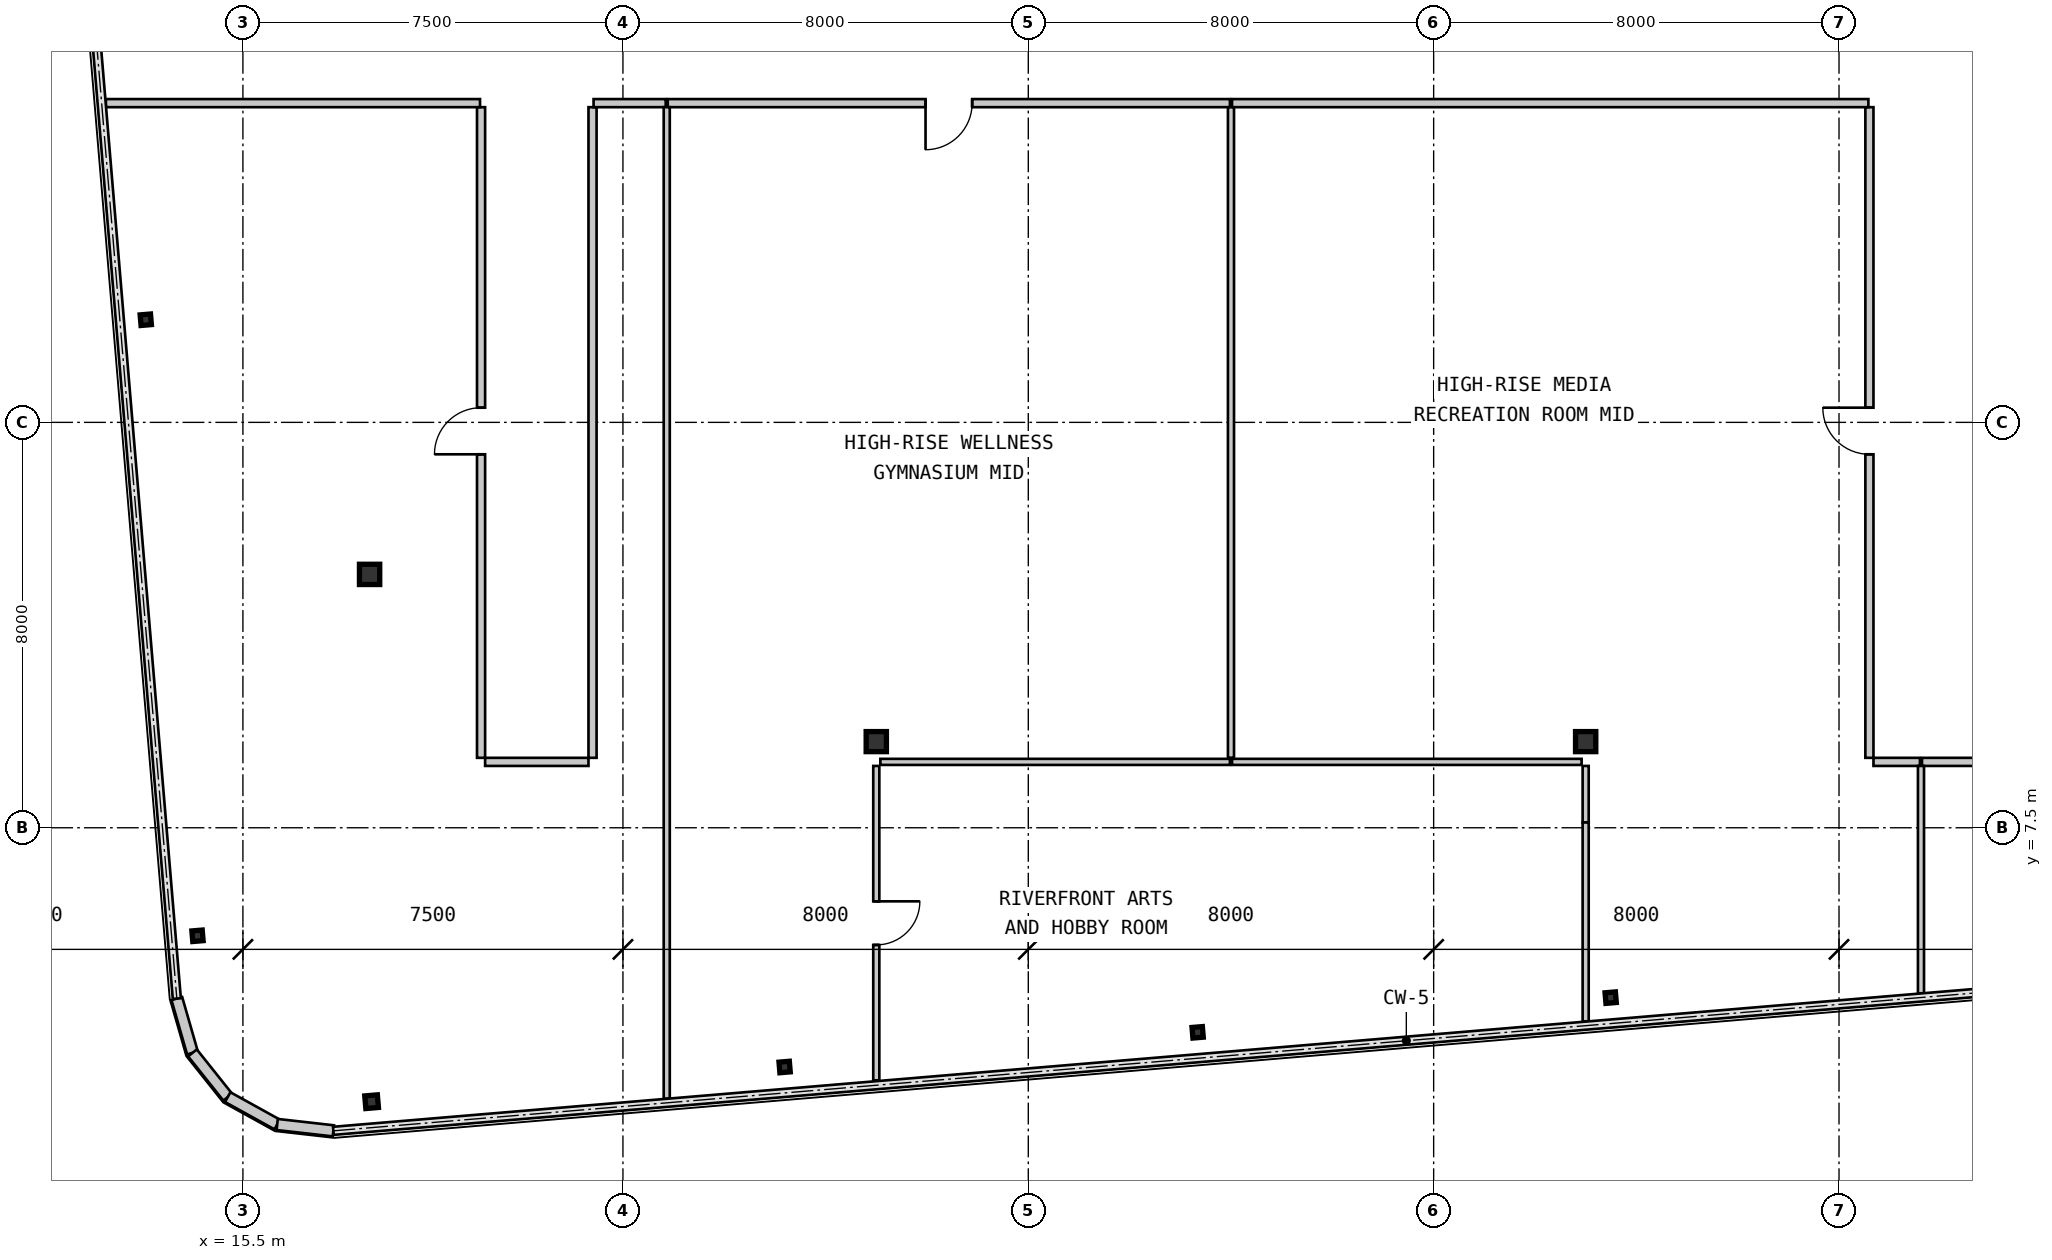
"""IFC4 building model, lengths in metres.
Left out: names, types, materials, properties, quantities, classifications, styles, units other than length and angle.
Written with IfcOpenShell. Run it as: python <this file> out.ifc"""

import sys

from ifc_helpers import new_model, si_unit, direction, frame, frame_2d, origin, origin_2d, place, context, subcontext, project, spatial, rectangle, hollow_rectangle, i_section, extrude, source, transform, mapped, element, fill, save


model = new_model("IFC4")
c1 = context("Model", 3, precision=1e-05, world=origin(), true_north=direction((0.0, 1.0)))
c2 = subcontext(c1, "Body", "Model", "MODEL_VIEW")
j1 = project(units=[si_unit("LENGTHUNIT", "METRE"), si_unit("PLANEANGLEUNIT", "RADIAN")], contexts=[c1])
p1 = place(None, origin())
s1 = spatial("IfcSite", under=j1, at=p1, CompositionType="ELEMENT")
p2 = place(p1, origin())
s2 = spatial("IfcBuilding", under=s1, at=p2, CompositionType="ELEMENT")
p3 = place(p2, frame((0.0, 0.0, 197.75)))
s3 = spatial("IfcBuildingStorey", under=s2, at=p3, CompositionType="ELEMENT", Elevation=197.75)
m1 = source(origin(), c2, "Body", "SweptSolid", [
    extrude(i_section(OverallWidth=0.4, OverallDepth=0.396, WebThickness=0.022, FlangeThickness=0.034, at=origin_2d()), origin(), (0.0, 0.0, 1.0), 3.15),
])
for number, where, z_axis, x_axis in (
    (1, (28.0, 9.2, 0.0), (0.0, 0.0, 1.0), (1.0, 0.0, 0.0)),
    (2, (42.0, 9.2, 0.0), (0.0, 0.0, 1.0), (1.0, 0.0, 0.0)),
):
    element("IfcColumn", number, at=place(p3, frame(where, z_axis=z_axis, x_axis=x_axis)), inside=s3, PredefinedType="COLUMN", context=c2, shape_type="MappedRepresentation", body=[
        mapped(m1, transform((0.0, 0.0, 0.0), scale=1.0)),
    ])
m2 = source(origin(), c2, "Body", "SweptSolid", [
    extrude(hollow_rectangle(XDim=0.4, YDim=0.4, WallThickness=0.016, at=origin_2d()), origin(), (0.0, 0.0, 1.0), 3.15),
])
p4 = place(p3, frame((18.0, 12.5, 0.0), z_axis=(0.0, 0.0, 1.0), x_axis=(1.0, 0.0, 0.0)))
e3 = element("IfcColumn", 3, at=p4, inside=s3, PredefinedType="COLUMN", context=c2, shape_type="MappedRepresentation", body=[
    mapped(m2, transform((0.0, 0.0, 0.0), scale=1.0)),
])
m3 = source(origin(), c2, "Body", "SweptSolid", [
    extrude(hollow_rectangle(XDim=0.25, YDim=0.25, WallThickness=0.01, at=origin_2d()), origin(), (0.0, 0.0, 1.0), 3.15),
])
p5 = place(p3, frame((18.04, 2.094, 0.0), z_axis=(0.0, 0.0, 1.0), x_axis=(0.99649285925, 0.083677843332, 0.0)))
e4 = element("IfcColumn", 4, at=p5, inside=s3, PredefinedType="COLUMN", context=c2, shape_type="MappedRepresentation", body=[
    mapped(m3, transform((0.0, 0.0, 0.0), scale=1.0)),
])
m4 = source(origin(), c2, "Body", "SweptSolid", [
    extrude(i_section(OverallWidth=0.205, OverallDepth=0.21, WebThickness=0.009, FlangeThickness=0.014, at=origin_2d()), origin(), (0.0, 0.0, 1.0), 3.15),
])
for number, where, z_axis, x_axis in (
    (5, (26.191, 2.779, 0.0), (0.0, 0.0, 1.0), (0.996, 0.084, 0.0)),
    (6, (34.342, 3.463, 0.0), (0.0, 0.0, 1.0), (0.996, 0.084, 0.0)),
    (7, (42.494, 4.147, 0.0), (0.0, 0.0, 1.0), (0.996, 0.084, 0.0)),
    (8, (14.604, 5.368, 0.0), (0.0, 0.0, 1.0), (0.996, 0.084, 0.0)),
    (9, (13.583, 17.525, 0.0), (0.0, 0.0, 1.0), (0.996, 0.084, 0.0)),
):
    element("IfcColumn", number, at=place(p3, frame(where, z_axis=z_axis, x_axis=x_axis)), inside=s3, PredefinedType="COLUMN", context=c2, shape_type="MappedRepresentation", body=[
        mapped(m4, transform((0.0, 0.0, 0.0), scale=1.0)),
    ])
m5 = source(origin(), c2, "Body", "SweptSolid", [
    extrude(rectangle(XDim=1.116, YDim=0.22, at=frame_2d((0.558, 0.0))), origin(), (0.0, 0.0, 1.0), 2.93),
])
for number, where, z_axis, x_axis in (
    (10, (14.196, 4.13, 0.0), (0.0, 0.0, 1.0), (0.277, -0.961, 0.0)),
    (11, (14.504, 3.057, 0.0), (0.0, 0.0, 1.0), (0.623, -0.782, 0.0)),
    (12, (15.2, 2.184, 0.0), (0.0, 0.0, 1.0), (0.875, -0.484, 0.0)),
    (13, (16.176, 1.644, 0.0), (0.0, 0.0, 1.0), (0.994, -0.112, 0.0)),
):
    element("IfcWall", number, at=place(p3, frame(where, z_axis=z_axis, x_axis=x_axis)), inside=s3, PredefinedType="SOLIDWALL", context=c2, shape_type="MappedRepresentation", body=[
        mapped(m5, transform((0.0, 0.0, 0.0), scale=1.0)),
    ])
m6 = source(origin(), c2, "Body", "SweptSolid", [
    extrude(rectangle(XDim=12.84, YDim=0.16, at=frame_2d((6.42, 0.0))), origin(), (0.0, 0.0, 1.0), 2.93),
])
p6 = place(p3, frame((20.2, 8.88, 0.0), z_axis=(0.0, 0.0, 1.0), x_axis=(0.0, 1.0, 0.0)))
e14 = element("IfcWall", 14, at=p6, inside=s3, PredefinedType="PARTITIONING", context=c2, shape_type="MappedRepresentation", body=[
    mapped(m6, transform((0.0, 0.0, 0.0), scale=1.0)),
])
m7 = source(origin(), c2, "Body", "SweptSolid", [
    extrude(rectangle(XDim=0.92, YDim=2.1, at=frame_2d((0.46, 1.05))), frame((0.0, 0.09, 0.0), z_axis=(0.0, -1.0, 0.0), x_axis=(1.0, 0.0, 0.0)), (0.0, 0.0, 1.0), 0.18),
])
p7 = place(p6, frame((5.99, 0.0, 0.0)))
e15 = element("IfcOpeningElement", 15, at=p7, cuts=e14, PredefinedType="OPENING", context=c2, shape_type="MappedRepresentation", body=[
    mapped(m7, transform((0.0, 0.0, 0.0), scale=1.0)),
])
p8 = place(p3, frame((22.4, 21.72, 0.0), z_axis=(0.0, 0.0, 1.0), x_axis=(0.0, -1.0, 0.0)))
e16 = element("IfcWall", 16, at=p8, inside=s3, PredefinedType="PARTITIONING", context=c2, shape_type="MappedRepresentation", body=[
    mapped(m6, transform((0.0, 0.0, 0.0), scale=1.0)),
])
m8 = source(origin(), c2, "Body", "SweptSolid", [
    extrude(rectangle(XDim=7.384, YDim=0.16, at=frame_2d((3.692, 0.0))), origin(), (0.0, 0.0, 1.0), 2.93),
])
p9 = place(p3, frame((20.18, 21.8, 0.0), z_axis=(0.0, 0.0, 1.0), x_axis=(-1.0, 0.0, 0.0)))
e17 = element("IfcWall", 17, at=p9, inside=s3, PredefinedType="PARTITIONING", context=c2, shape_type="MappedRepresentation", body=[
    mapped(m8, transform((0.0, 0.0, 0.0), scale=1.0)),
])
m9 = source(origin(), c2, "Body", "SweptSolid", [
    extrude(rectangle(XDim=2.04, YDim=0.16, at=frame_2d((1.02, 0.0))), origin(), (0.0, 0.0, 1.0), 2.93),
])
p10 = place(p3, frame((22.32, 8.8, 0.0), z_axis=(0.0, 0.0, 1.0), x_axis=(-1.0, 0.0, 0.0)))
e18 = element("IfcWall", 18, at=p10, inside=s3, PredefinedType="PARTITIONING", context=c2, shape_type="MappedRepresentation", body=[
    mapped(m9, transform((0.0, 0.0, 0.0), scale=1.0)),
])
m10 = source(origin(), c2, "Body", "SweptSolid", [
    extrude(rectangle(XDim=1.424, YDim=0.16, at=frame_2d((0.712, 0.0))), origin(), (0.0, 0.0, 1.0), 2.93),
])
p11 = place(p3, frame((23.844, 21.8, 0.0), z_axis=(0.0, 0.0, 1.0), x_axis=(-1.0, 0.0, 0.0)))
e19 = element("IfcWall", 19, at=p11, inside=s3, PredefinedType="PARTITIONING", context=c2, shape_type="MappedRepresentation", body=[
    mapped(m10, transform((0.0, 0.0, 0.0), scale=1.0)),
])
m11 = source(origin(), c2, "Body", "SweptSolid", [
    extrude(rectangle(XDim=11.095, YDim=0.16, at=frame_2d((5.547, 0.0))), origin(), (0.0, 0.0, 1.0), 2.93),
])
p12 = place(p3, frame((34.98, 21.8, 0.0), z_axis=(0.0, 0.0, 1.0), x_axis=(-1.0, 0.0, 0.0)))
e20 = element("IfcWall", 20, at=p12, inside=s3, PredefinedType="PARTITIONING", context=c2, shape_type="MappedRepresentation", body=[
    mapped(m11, transform((0.0, 0.0, 0.0), scale=1.0)),
])
p13 = place(p12, frame((5.087, 0.0, 0.0)))
e21 = element("IfcOpeningElement", 21, at=p13, cuts=e20, PredefinedType="OPENING", context=c2, shape_type="MappedRepresentation", body=[
    mapped(m7, transform((0.0, 0.0, 0.0), scale=1.0)),
])
p14 = place(p3, frame((47.6, 8.88, 0.0), z_axis=(0.0, 0.0, 1.0), x_axis=(0.0, 1.0, 0.0)))
e22 = element("IfcWall", 22, at=p14, inside=s3, PredefinedType="PARTITIONING", context=c2, shape_type="MappedRepresentation", body=[
    mapped(m6, transform((0.0, 0.0, 0.0), scale=1.0)),
])
p15 = place(p14, frame((5.99, 0.0, 0.0)))
e23 = element("IfcOpeningElement", 23, at=p15, cuts=e22, PredefinedType="OPENING", context=c2, shape_type="MappedRepresentation", body=[
    mapped(m7, transform((0.0, 0.0, 0.0), scale=1.0)),
])
m12 = source(origin(), c2, "Body", "SweptSolid", [
    extrude(rectangle(XDim=12.559, YDim=0.16, at=frame_2d((6.28, 0.0))), origin(), (0.0, 0.0, 1.0), 2.93),
])
p16 = place(p3, frame((47.58, 21.8, 0.0), z_axis=(0.0, 0.0, 1.0), x_axis=(-1.0, 0.0, 0.0)))
e24 = element("IfcWall", 24, at=p16, inside=s3, PredefinedType="PARTITIONING", context=c2, shape_type="MappedRepresentation", body=[
    mapped(m12, transform((0.0, 0.0, 0.0), scale=1.0)),
])
m13 = source(origin(), c2, "Body", "SweptSolid", [
    extrude(rectangle(XDim=0.917, YDim=0.16, at=frame_2d((0.459, 0.0))), origin(), (0.0, 0.0, 1.0), 2.93),
])
p17 = place(p3, frame((48.597, 8.8, 0.0), z_axis=(0.0, 0.0, 1.0), x_axis=(-1.0, 0.0, 0.0)))
e25 = element("IfcWall", 25, at=p17, inside=s3, PredefinedType="PARTITIONING", context=c2, shape_type="MappedRepresentation", body=[
    mapped(m13, transform((0.0, 0.0, 0.0), scale=1.0)),
])
m14 = source(origin(), c2, "Body", "SweptSolid", [
    extrude(rectangle(XDim=1.082, YDim=0.16, at=frame_2d((0.541, 0.0))), origin(), (0.0, 0.0, 1.0), 2.93),
])
p18 = place(p3, frame((49.72, 8.8, 0.0), z_axis=(0.0, 0.0, 1.0), x_axis=(-1.0, 0.0, 0.0)))
e26 = element("IfcWall", 26, at=p18, inside=s3, PredefinedType="PARTITIONING", context=c2, shape_type="MappedRepresentation", body=[
    mapped(m14, transform((0.0, 0.0, 0.0), scale=1.0)),
])
m15 = source(origin(), c2, "Body", "SweptSolid", [
    extrude(rectangle(XDim=6.9, YDim=0.12, at=frame_2d((3.45, 0.0))), origin(), (0.0, 0.0, 1.0), 2.93),
])
p19 = place(p3, frame((28.08, 8.8, 0.0), z_axis=(0.0, 0.0, 1.0), x_axis=(1.0, 0.0, 0.0)))
e27 = element("IfcWall", 27, at=p19, inside=s3, PredefinedType="PARTITIONING", context=c2, shape_type="MappedRepresentation", body=[
    mapped(m15, transform((0.0, 0.0, 0.0), scale=1.0)),
])
m16 = source(origin(), c2, "Body", "SweptSolid", [
    extrude(rectangle(XDim=6.204, YDim=0.12, at=frame_2d((3.102, 0.0))), origin(), (0.0, 0.0, 1.0), 2.93),
])
p20 = place(p3, frame((28.0, 2.516, 0.0), z_axis=(0.0, 0.0, 1.0), x_axis=(0.0, 1.0, 0.0)))
e28 = element("IfcWall", 28, at=p20, inside=s3, PredefinedType="PARTITIONING", context=c2, shape_type="MappedRepresentation", body=[
    mapped(m16, transform((0.0, 0.0, 0.0), scale=1.0)),
])
m17 = source(origin(), c2, "Body", "SweptSolid", [
    extrude(rectangle(XDim=0.86, YDim=2.1, at=frame_2d((0.43, 1.05))), frame((0.0, 0.07, 0.0), z_axis=(0.0, -1.0, 0.0), x_axis=(1.0, 0.0, 0.0)), (0.0, 0.0, 1.0), 0.14),
])
p21 = place(p20, frame((2.672, 0.0, 0.0)))
e29 = element("IfcOpeningElement", 29, at=p21, cuts=e28, PredefinedType="OPENING", context=c2, shape_type="MappedRepresentation", body=[
    mapped(m17, transform((0.0, 0.0, 0.0), scale=1.0)),
])
p22 = place(p3, frame((35.02, 8.8, 0.0), z_axis=(0.0, 0.0, 1.0), x_axis=(1.0, 0.0, 0.0)))
e30 = element("IfcWall", 30, at=p22, inside=s3, PredefinedType="PARTITIONING", context=c2, shape_type="MappedRepresentation", body=[
    mapped(m15, transform((0.0, 0.0, 0.0), scale=1.0)),
])
m18 = source(origin(), c2, "Body", "SweptSolid", [
    extrude(rectangle(XDim=1.116, YDim=0.12, at=frame_2d((0.558, 0.0))), origin(), (0.0, 0.0, 1.0), 2.47),
])
p23 = place(p3, frame((42.0, 8.72, 0.0), z_axis=(0.0, 0.0, 1.0), x_axis=(0.0, -1.0, 0.0)))
e31 = element("IfcWall", 31, at=p23, inside=s3, PredefinedType="PARTITIONING", context=c2, shape_type="MappedRepresentation", body=[
    mapped(m18, transform((0.0, 0.0, 0.0), scale=1.0)),
])
m19 = source(origin(), c2, "Body", "SweptSolid", [
    extrude(rectangle(XDim=3.926, YDim=0.12, at=frame_2d((1.963, 0.0))), origin(), (0.0, 0.0, 1.0), 2.93),
])
p24 = place(p3, frame((42.0, 7.604, 0.0), z_axis=(0.0, 0.0, 1.0), x_axis=(0.0, -1.0, 0.0)))
e32 = element("IfcWall", 32, at=p24, inside=s3, PredefinedType="PARTITIONING", context=c2, shape_type="MappedRepresentation", body=[
    mapped(m19, transform((0.0, 0.0, 0.0), scale=1.0)),
])
m20 = source(origin(), c2, "Body", "SweptSolid", [
    extrude(rectangle(XDim=19.565, YDim=0.12, at=frame_2d((9.782, 0.0))), origin(), (0.0, 0.0, 1.0), 2.93),
])
p25 = place(p3, frame((23.865, 21.72, 0.0), z_axis=(0.0, 0.0, 1.0), x_axis=(0.0, -1.0, 0.0)))
e33 = element("IfcWall", 33, at=p25, inside=s3, PredefinedType="PARTITIONING", context=c2, shape_type="MappedRepresentation", body=[
    mapped(m20, transform((0.0, 0.0, 0.0), scale=1.0)),
])
m21 = source(origin(), c2, "Body", "SweptSolid", [
    extrude(rectangle(XDim=12.836, YDim=0.12, at=frame_2d((6.418, 0.0))), origin(), (0.0, 0.0, 1.0), 2.93),
])
p26 = place(p3, frame((35.0, 21.718, 0.0), z_axis=(0.0, 0.0, 1.0), x_axis=(0.0, -1.0, 0.0)))
e34 = element("IfcWall", 34, at=p26, inside=s3, PredefinedType="PARTITIONING", context=c2, shape_type="MappedRepresentation", body=[
    mapped(m21, transform((0.0, 0.0, 0.0), scale=1.0)),
])
m22 = source(origin(), c2, "Body", "SweptSolid", [
    extrude(rectangle(XDim=4.487, YDim=0.12, at=frame_2d((2.243, 0.0))), origin(), (0.0, 0.0, 1.0), 2.93),
])
p27 = place(p3, frame((48.618, 8.72, 0.0), z_axis=(0.0, 0.0, 1.0), x_axis=(0.0, -1.0, 0.0)))
e35 = element("IfcWall", 35, at=p27, inside=s3, PredefinedType="PARTITIONING", context=c2, shape_type="MappedRepresentation", body=[
    mapped(m22, transform((0.0, 0.0, 0.0), scale=1.0)),
])
m23 = source(origin(), c2, "Body", "SweptSolid", [
    extrude(rectangle(XDim=0.92, YDim=2.1, at=frame_2d((0.46, 1.05))), frame((0.0, 0.025, 0.0), z_axis=(0.0, -1.0, 0.0), x_axis=(1.0, 0.0, 0.0)), (0.0, 0.0, 1.0), 0.05),
])
p28 = place(p7, origin())
e36 = element("IfcDoor", 36, at=p28, inside=s3, OperationType="SINGLE_SWING_LEFT", PredefinedType="DOOR", context=c2, shape_type="MappedRepresentation", body=[
    mapped(m23, transform((0.0, 0.0, 0.0), scale=1.0)),
])
fill(e15, e36)
p29 = place(p13, origin())
e37 = element("IfcDoor", 37, at=p29, inside=s3, OperationType="SINGLE_SWING_RIGHT", PredefinedType="DOOR", context=c2, shape_type="MappedRepresentation", body=[
    mapped(m23, transform((0.0, 0.0, 0.0), scale=1.0)),
])
fill(e21, e37)
p30 = place(p15, origin())
e38 = element("IfcDoor", 38, at=p30, inside=s3, OperationType="SINGLE_SWING_RIGHT", PredefinedType="DOOR", context=c2, shape_type="MappedRepresentation", body=[
    mapped(m23, transform((0.0, 0.0, 0.0), scale=1.0)),
])
fill(e23, e38)
m24 = source(origin(), c2, "Body", "SweptSolid", [
    extrude(rectangle(XDim=0.86, YDim=2.1, at=frame_2d((0.43, 1.05))), frame((0.0, 0.025, 0.0), z_axis=(0.0, -1.0, 0.0), x_axis=(1.0, 0.0, 0.0)), (0.0, 0.0, 1.0), 0.05),
])
p31 = place(p21, frame((0.86, 0.0, 0.0), z_axis=(0.0, 0.0, 1.0), x_axis=(-1.0, 0.0, 0.0)))
e39 = element("IfcDoor", 39, at=p31, inside=s3, OperationType="SINGLE_SWING_LEFT", PredefinedType="DOOR", context=c2, shape_type="MappedRepresentation", body=[
    mapped(m24, transform((0.0, 0.0, 0.0), scale=1.0)),
])
fill(e29, e39)
save(model, sys.argv[1])
